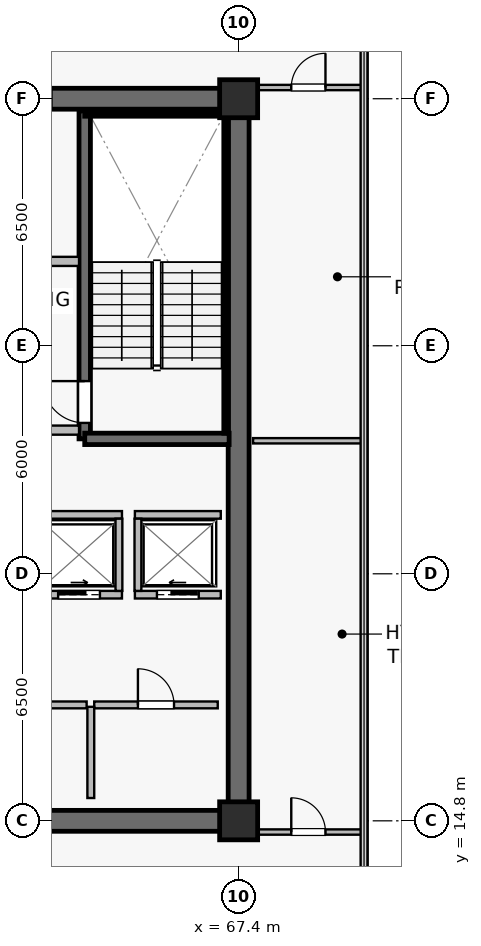
"""IFC4 building model, lengths in metres.
Left out: names, types, materials, properties, quantities, classifications, styles, units other than length and angle.
Written with IfcOpenShell. Run it as: python <this file> out.ifc"""

import sys

from ifc_helpers import new_model, si_unit, direction, frame, frame_2d, origin, origin_2d, place, context, subcontext, project, spatial, rectangle, extrude, source, transform, mapped, element, fill, save


model = new_model("IFC4")
c1 = context("Model", 3, precision=1e-05, world=origin(), true_north=direction((0.0, 1.0)))
c2 = subcontext(c1, "Body", "Model", "MODEL_VIEW")
j1 = project(units=[si_unit("LENGTHUNIT", "METRE"), si_unit("PLANEANGLEUNIT", "RADIAN")], contexts=[c1])
p1 = place(None, origin())
s1 = spatial("IfcSite", under=j1, at=p1, CompositionType="ELEMENT")
p2 = place(p1, origin())
s2 = spatial("IfcBuilding", under=s1, at=p2, CompositionType="ELEMENT")
p3 = place(p2, frame((0.0, 0.0, 226.0)))
s3 = spatial("IfcBuildingStorey", under=s2, at=p3, CompositionType="ELEMENT", Elevation=226.0)
p4 = place(p3, frame((52.325, 14.8, 0.0), z_axis=(0.0, 0.0, 1.0), x_axis=(1.0, 0.0, 0.0)))
e1 = element("IfcWall", 1, at=p4, inside=s3, PredefinedType="SHEAR", context=c2, shape_type="SweptSolid", body=[
    extrude(rectangle(XDim=15.35, YDim=0.55, at=frame_2d((7.675, 0.0))), origin(), (0.0, 0.0, 1.0), 3.8),
])
p5 = place(p3, frame((52.325, 33.8, 0.0), z_axis=(0.0, 0.0, 1.0), x_axis=(1.0, 0.0, 0.0)))
e2 = element("IfcWall", 2, at=p5, inside=s3, PredefinedType="SHEAR", context=c2, shape_type="SweptSolid", body=[
    extrude(rectangle(XDim=15.35, YDim=0.55, at=frame_2d((7.675, 0.0))), origin(), (0.0, 0.0, 1.0), 3.8),
])
p6 = place(p5, frame((9.2, 0.0, 0.0)))
e3 = element("IfcOpeningElement", 3, at=p6, cuts=e2, PredefinedType="OPENING", context=c2, shape_type="SweptSolid", body=[
    extrude(rectangle(XDim=0.95, YDim=2.15, at=frame_2d((0.475, 1.075))), frame((0.0, 0.285, 0.0), z_axis=(0.0, -1.0, 0.0), x_axis=(1.0, 0.0, 0.0)), (0.0, 0.0, 1.0), 0.57),
])
p7 = place(p5, frame((6.685, 0.0, 0.0)))
e4 = element("IfcOpeningElement", 4, at=p7, cuts=e2, PredefinedType="OPENING", context=c2, shape_type="SweptSolid", body=[
    extrude(rectangle(XDim=0.95, YDim=2.15, at=frame_2d((0.475, 1.075))), frame((0.0, 0.285, 0.0), z_axis=(0.0, -1.0, 0.0), x_axis=(1.0, 0.0, 0.0)), (0.0, 0.0, 1.0), 0.57),
])
p8 = place(p5, frame((4.135, 0.0, 0.0)))
e5 = element("IfcOpeningElement", 5, at=p8, cuts=e2, PredefinedType="OPENING", context=c2, shape_type="SweptSolid", body=[
    extrude(rectangle(XDim=0.95, YDim=2.15, at=frame_2d((0.475, 1.075))), frame((0.0, 0.285, 0.0), z_axis=(0.0, -1.0, 0.0), x_axis=(1.0, 0.0, 0.0)), (0.0, 0.0, 1.0), 0.57),
])
p9 = place(p5, frame((1.585, 0.0, 0.0)))
e6 = element("IfcOpeningElement", 6, at=p9, cuts=e2, PredefinedType="OPENING", context=c2, shape_type="SweptSolid", body=[
    extrude(rectangle(XDim=0.95, YDim=2.15, at=frame_2d((0.475, 1.075))), frame((0.0, 0.285, 0.0), z_axis=(0.0, -1.0, 0.0), x_axis=(1.0, 0.0, 0.0)), (0.0, 0.0, 1.0), 0.57),
])
p10 = place(p3, frame((67.4, 15.075, 0.0), z_axis=(0.0, 0.0, 1.0), x_axis=(0.0, 1.0, 0.0)))
e7 = element("IfcWall", 7, at=p10, inside=s3, PredefinedType="SHEAR", context=c2, shape_type="SweptSolid", body=[
    extrude(rectangle(XDim=18.45, YDim=0.55, at=frame_2d((9.225, 0.0))), origin(), (0.0, 0.0, 1.0), 3.8),
])
p11 = place(p3, frame((63.35, 24.85, 0.0), z_axis=(0.0, 0.0, 1.0), x_axis=(0.0, 1.0, 0.0)))
e8 = element("IfcWall", 8, at=p11, inside=s3, PredefinedType="SHEAR", context=c2, shape_type="SweptSolid", body=[
    extrude(rectangle(XDim=8.63, YDim=0.3, at=frame_2d((4.315, 0.0))), origin(), (0.0, 0.0, 1.0), 3.8),
])
p12 = place(p11, frame((0.42, 0.0, 0.0)))
e9 = element("IfcOpeningElement", 9, at=p12, cuts=e8, PredefinedType="OPENING", context=c2, shape_type="SweptSolid", body=[
    extrude(rectangle(XDim=1.1, YDim=2.15, at=frame_2d((0.55, 1.075))), frame((0.0, 0.16, 0.0), z_axis=(0.0, -1.0, 0.0), x_axis=(1.0, 0.0, 0.0)), (0.0, 0.0, 1.0), 0.32),
])
p13 = place(p3, frame((63.35, 24.85, 0.0), z_axis=(0.0, 0.0, 1.0), x_axis=(1.0, 0.0, 0.0)))
e10 = element("IfcWall", 10, at=p13, inside=s3, PredefinedType="SHEAR", context=c2, shape_type="SweptSolid", body=[
    extrude(rectangle(XDim=3.8, YDim=0.3, at=frame_2d((1.9, 0.0))), origin(), (0.0, 0.0, 1.0), 3.8),
])
p14 = place(p3, frame((63.35, 33.4, 0.0), z_axis=(0.0, 0.0, 1.0), x_axis=(1.0, 0.0, 0.0)))
e11 = element("IfcWall", 11, at=p14, inside=s3, PredefinedType="SOLIDWALL", context=c2, shape_type="SweptSolid", body=[
    extrude(rectangle(XDim=3.72, YDim=0.12, at=frame_2d((1.86, 0.0))), origin(), (0.0, 0.0, 1.0), 3.8),
])
p15 = place(p3, frame((67.07, 25.0, 0.0), z_axis=(0.0, 0.0, 1.0), x_axis=(0.0, 1.0, 0.0)))
e12 = element("IfcWall", 12, at=p15, inside=s3, PredefinedType="SOLIDWALL", context=c2, shape_type="SweptSolid", body=[
    extrude(rectangle(XDim=8.32, YDim=0.12, at=frame_2d((4.16, 0.0))), origin(), (0.0, 0.0, 1.0), 3.8),
])
m1 = source(origin(), c2, "Body", "SweptSolid", [
    extrude(rectangle(XDim=1.0, YDim=1.0, at=origin_2d()), origin(), (0.0, 0.0, 1.0), 4.1),
])
for number, where, z_axis, x_axis in (
    (13, (67.4, 14.8, 0.0), (0.0, 0.0, 1.0), (1.0, 0.0, 0.0)),
    (14, (67.4, 33.8, 0.0), (0.0, 0.0, 1.0), (1.0, 0.0, 0.0)),
):
    element("IfcColumn", number, at=place(p3, frame(where, z_axis=z_axis, x_axis=x_axis)), inside=s3, PredefinedType="COLUMN", context=c2, shape_type="MappedRepresentation", body=[
        mapped(m1, transform((0.0, 0.0, 0.0), scale=1.0)),
    ])
p16 = place(p3, frame((56.28, 25.08, 0.0), z_axis=(0.0, 0.0, 1.0), x_axis=(1.0, 0.0, 0.0)))
e15 = element("IfcWall", 15, at=p16, inside=s3, PredefinedType="SOLIDWALL", context=c2, shape_type="SweptSolid", body=[
    extrude(rectangle(XDim=6.92, YDim=0.24, at=frame_2d((3.46, 0.0))), origin(), (0.0, 0.0, 1.0), 3.197),
])
p17 = place(p16, frame((2.6, 0.0, 0.0)))
e16 = element("IfcOpeningElement", 16, at=p17, cuts=e15, PredefinedType="OPENING", context=c2, shape_type="SweptSolid", body=[
    extrude(rectangle(XDim=1.2, YDim=2.16, at=frame_2d((0.6, 1.08))), frame((0.0, 0.13, 0.0), z_axis=(0.0, -1.0, 0.0), x_axis=(1.0, 0.0, 0.0)), (0.0, 0.0, 1.0), 0.26),
])
p18 = place(p3, frame((56.28, 29.52, 0.0), z_axis=(0.0, 0.0, 1.0), x_axis=(1.0, 0.0, 0.0)))
e17 = element("IfcWall", 17, at=p18, inside=s3, PredefinedType="SOLIDWALL", context=c2, shape_type="SweptSolid", body=[
    extrude(rectangle(XDim=6.92, YDim=0.24, at=frame_2d((3.46, 0.0))), origin(), (0.0, 0.0, 1.0), 3.197),
])
p19 = place(p3, frame((64.67, 20.75, 0.0), z_axis=(0.0, 0.0, 1.0), x_axis=(1.0, 0.0, 0.0)))
e18 = element("IfcWall", 18, at=p19, inside=s3, PredefinedType="SOLIDWALL", context=c2, shape_type="SweptSolid", body=[
    extrude(rectangle(XDim=2.26, YDim=0.2, at=frame_2d((1.13, 0.0))), origin(), (0.0, 0.0, 1.0), 3.8),
])
p20 = place(p19, frame((0.58, 0.0, 0.0)))
e19 = element("IfcOpeningElement", 19, at=p20, cuts=e18, PredefinedType="OPENING", context=c2, shape_type="SweptSolid", body=[
    extrude(rectangle(XDim=1.1, YDim=2.22, at=frame_2d((0.55, 1.11))), frame((0.0, 0.11, 0.0), z_axis=(0.0, -1.0, 0.0), x_axis=(1.0, 0.0, 0.0)), (0.0, 0.0, 1.0), 0.22),
])
p21 = place(p3, frame((64.67, 22.85, 0.0), z_axis=(0.0, 0.0, 1.0), x_axis=(1.0, 0.0, 0.0)))
e20 = element("IfcWall", 20, at=p21, inside=s3, PredefinedType="SOLIDWALL", context=c2, shape_type="SweptSolid", body=[
    extrude(rectangle(XDim=2.26, YDim=0.2, at=frame_2d((1.13, 0.0))), origin(), (0.0, 0.0, 1.0), 3.8),
])
p22 = place(p3, frame((64.75, 20.85, 0.0), z_axis=(0.0, 0.0, 1.0), x_axis=(0.0, 1.0, 0.0)))
e21 = element("IfcWall", 21, at=p22, inside=s3, PredefinedType="SOLIDWALL", context=c2, shape_type="SweptSolid", body=[
    extrude(rectangle(XDim=1.9, YDim=0.18, at=frame_2d((0.95, 0.0))), origin(), (0.0, 0.0, 1.0), 3.8),
])
p23 = place(p3, frame((62.07, 20.75, 0.0), z_axis=(0.0, 0.0, 1.0), x_axis=(1.0, 0.0, 0.0)))
e22 = element("IfcWall", 22, at=p23, inside=s3, PredefinedType="SOLIDWALL", context=c2, shape_type="SweptSolid", body=[
    extrude(rectangle(XDim=2.26, YDim=0.2, at=frame_2d((1.13, 0.0))), origin(), (0.0, 0.0, 1.0), 3.8),
])
p24 = place(p23, frame((0.58, 0.0, 0.0)))
e23 = element("IfcOpeningElement", 23, at=p24, cuts=e22, PredefinedType="OPENING", context=c2, shape_type="SweptSolid", body=[
    extrude(rectangle(XDim=1.1, YDim=2.22, at=frame_2d((0.55, 1.11))), frame((0.0, 0.11, 0.0), z_axis=(0.0, -1.0, 0.0), x_axis=(1.0, 0.0, 0.0)), (0.0, 0.0, 1.0), 0.22),
])
p25 = place(p3, frame((62.07, 22.85, 0.0), z_axis=(0.0, 0.0, 1.0), x_axis=(1.0, 0.0, 0.0)))
e24 = element("IfcWall", 24, at=p25, inside=s3, PredefinedType="SOLIDWALL", context=c2, shape_type="SweptSolid", body=[
    extrude(rectangle(XDim=2.26, YDim=0.2, at=frame_2d((1.13, 0.0))), origin(), (0.0, 0.0, 1.0), 3.8),
])
p26 = place(p3, frame((64.25, 20.85, 0.0), z_axis=(0.0, 0.0, 1.0), x_axis=(0.0, 1.0, 0.0)))
e25 = element("IfcWall", 25, at=p26, inside=s3, PredefinedType="SOLIDWALL", context=c2, shape_type="SweptSolid", body=[
    extrude(rectangle(XDim=1.9, YDim=0.18, at=frame_2d((0.95, 0.0))), origin(), (0.0, 0.0, 1.0), 3.8),
])
p27 = place(p3, frame((63.6, 17.85, 0.0), z_axis=(0.0, 0.0, 1.0), x_axis=(1.0, 0.0, 0.0)))
e26 = element("IfcWall", 26, at=p27, inside=s3, PredefinedType="SOLIDWALL", context=c2, shape_type="SweptSolid", body=[
    extrude(rectangle(XDim=3.25, YDim=0.18, at=frame_2d((1.625, 0.0))), origin(), (0.0, 0.0, 1.0), 3.8),
])
p28 = place(p27, frame((1.15, 0.0, 0.0)))
e27 = element("IfcOpeningElement", 27, at=p28, cuts=e26, PredefinedType="OPENING", context=c2, shape_type="SweptSolid", body=[
    extrude(rectangle(XDim=0.95, YDim=2.15, at=frame_2d((0.475, 1.075))), frame((0.0, 0.1, 0.0), z_axis=(0.0, -1.0, 0.0), x_axis=(1.0, 0.0, 0.0)), (0.0, 0.0, 1.0), 0.2),
])
p29 = place(p3, frame((63.51, 15.4, 0.0), z_axis=(0.0, 0.0, 1.0), x_axis=(0.0, 1.0, 0.0)))
e28 = element("IfcWall", 28, at=p29, inside=s3, PredefinedType="SOLIDWALL", context=c2, shape_type="SweptSolid", body=[
    extrude(rectangle(XDim=2.4, YDim=0.18, at=frame_2d((1.2, 0.0))), origin(), (0.0, 0.0, 1.0), 3.8),
])
p30 = place(p3, frame((60.1, 17.85, 0.0), z_axis=(0.0, 0.0, 1.0), x_axis=(1.0, 0.0, 0.0)))
e29 = element("IfcWall", 29, at=p30, inside=s3, PredefinedType="SOLIDWALL", context=c2, shape_type="SweptSolid", body=[
    extrude(rectangle(XDim=3.3, YDim=0.18, at=frame_2d((1.65, 0.0))), origin(), (0.0, 0.0, 1.0), 3.197),
])
p31 = place(p30, frame((1.175, 0.0, 0.0)))
e30 = element("IfcOpeningElement", 30, at=p31, cuts=e29, PredefinedType="OPENING", context=c2, shape_type="SweptSolid", body=[
    extrude(rectangle(XDim=0.95, YDim=2.15, at=frame_2d((0.475, 1.075))), frame((0.0, 0.1, 0.0), z_axis=(0.0, -1.0, 0.0), x_axis=(1.0, 0.0, 0.0)), (0.0, 0.0, 1.0), 0.2),
])
p32 = place(p3, frame((67.78, 24.8, 0.0), z_axis=(0.0, 0.0, 1.0), x_axis=(1.0, 0.0, 0.0)))
e31 = element("IfcWall", 31, at=p32, inside=s3, PredefinedType="PARTITIONING", context=c2, shape_type="SweptSolid", body=[
    extrude(rectangle(XDim=2.91, YDim=0.14, at=frame_2d((1.455, 0.0))), origin(), (0.0, 0.0, 1.0), 3.8),
])
p33 = place(p3, frame((67.78, 14.505, 0.0), z_axis=(0.0, 0.0, 1.0), x_axis=(1.0, 0.0, 0.0)))
e32 = element("IfcWall", 32, at=p33, inside=s3, PredefinedType="PARTITIONING", context=c2, shape_type="SweptSolid", body=[
    extrude(rectangle(XDim=2.91, YDim=0.14, at=frame_2d((1.455, 0.0))), origin(), (0.0, 0.0, 1.0), 3.8),
])
p34 = place(p33, frame((1.005, 0.0, 0.0)))
e33 = element("IfcOpeningElement", 33, at=p34, cuts=e32, PredefinedType="OPENING", context=c2, shape_type="SweptSolid", body=[
    extrude(rectangle(XDim=0.9, YDim=2.1, at=frame_2d((0.45, 1.05))), frame((0.0, 0.08, 0.0), z_axis=(0.0, -1.0, 0.0), x_axis=(1.0, 0.0, 0.0)), (0.0, 0.0, 1.0), 0.16),
])
p35 = place(p3, frame((67.78, 34.095, 0.0), z_axis=(0.0, 0.0, 1.0), x_axis=(1.0, 0.0, 0.0)))
e34 = element("IfcWall", 34, at=p35, inside=s3, PredefinedType="PARTITIONING", context=c2, shape_type="SweptSolid", body=[
    extrude(rectangle(XDim=2.91, YDim=0.14, at=frame_2d((1.455, 0.0))), origin(), (0.0, 0.0, 1.0), 3.8),
])
p36 = place(p35, frame((1.005, 0.0, 0.0)))
e35 = element("IfcOpeningElement", 35, at=p36, cuts=e34, PredefinedType="OPENING", context=c2, shape_type="SweptSolid", body=[
    extrude(rectangle(XDim=0.9, YDim=2.1, at=frame_2d((0.45, 1.05))), frame((0.0, 0.08, 0.0), z_axis=(0.0, -1.0, 0.0), x_axis=(1.0, 0.0, 0.0)), (0.0, 0.0, 1.0), 0.16),
])
m2 = source(origin(), c2, "Body", "SweptSolid", [
    extrude(rectangle(XDim=1.1, YDim=2.15, at=frame_2d((0.55, 1.075))), frame((0.0, 0.025, 0.0), z_axis=(0.0, -1.0, 0.0), x_axis=(1.0, 0.0, 0.0)), (0.0, 0.0, 1.0), 0.05),
])
p37 = place(p12, origin())
e36 = element("IfcDoor", 36, at=p37, inside=s3, OperationType="SINGLE_SWING_RIGHT", PredefinedType="DOOR", context=c2, shape_type="MappedRepresentation", body=[
    mapped(m2, transform((0.0, 0.0, 0.0), scale=1.0)),
])
fill(e9, e36)
m3 = source(origin(), c2, "Body", "SweptSolid", [
    extrude(rectangle(XDim=1.1, YDim=2.22, at=frame_2d((0.55, 1.11))), frame((0.0, 0.025, 0.0), z_axis=(0.0, -1.0, 0.0), x_axis=(1.0, 0.0, 0.0)), (0.0, 0.0, 1.0), 0.05),
])
p38 = place(p20, origin())
e37 = element("IfcDoor", 37, at=p38, inside=s3, OperationType="SLIDING_TO_LEFT", PredefinedType="USERDEFINED", context=c2, shape_type="MappedRepresentation", body=[
    mapped(m3, transform((0.0, 0.0, 0.0), scale=1.0)),
])
fill(e19, e37)
p39 = place(p24, origin())
e38 = element("IfcDoor", 38, at=p39, inside=s3, OperationType="SLIDING_TO_RIGHT", PredefinedType="USERDEFINED", context=c2, shape_type="MappedRepresentation", body=[
    mapped(m3, transform((0.0, 0.0, 0.0), scale=1.0)),
])
fill(e23, e38)
m4 = source(origin(), c2, "Body", "SweptSolid", [
    extrude(rectangle(XDim=0.95, YDim=2.15, at=frame_2d((0.475, 1.075))), frame((0.0, 0.025, 0.0), z_axis=(0.0, -1.0, 0.0), x_axis=(1.0, 0.0, 0.0)), (0.0, 0.0, 1.0), 0.05),
])
p40 = place(p28, origin())
e39 = element("IfcDoor", 39, at=p40, inside=s3, OperationType="SINGLE_SWING_LEFT", PredefinedType="DOOR", context=c2, shape_type="MappedRepresentation", body=[
    mapped(m4, transform((0.0, 0.0, 0.0), scale=1.0)),
])
fill(e27, e39)
m5 = source(origin(), c2, "Body", "SweptSolid", [
    extrude(rectangle(XDim=0.9, YDim=2.1, at=frame_2d((0.45, 1.05))), frame((0.0, 0.025, 0.0), z_axis=(0.0, -1.0, 0.0), x_axis=(1.0, 0.0, 0.0)), (0.0, 0.0, 1.0), 0.05),
])
p41 = place(p34, origin())
e40 = element("IfcDoor", 40, at=p41, inside=s3, OperationType="SINGLE_SWING_LEFT", PredefinedType="DOOR", context=c2, shape_type="MappedRepresentation", body=[
    mapped(m5, transform((0.0, 0.0, 0.0), scale=1.0)),
])
fill(e33, e40)
p42 = place(p36, origin())
e41 = element("IfcDoor", 41, at=p42, inside=s3, OperationType="SINGLE_SWING_RIGHT", PredefinedType="DOOR", context=c2, shape_type="MappedRepresentation", body=[
    mapped(m5, transform((0.0, 0.0, 0.0), scale=1.0)),
])
fill(e35, e41)
save(model, sys.argv[1])
